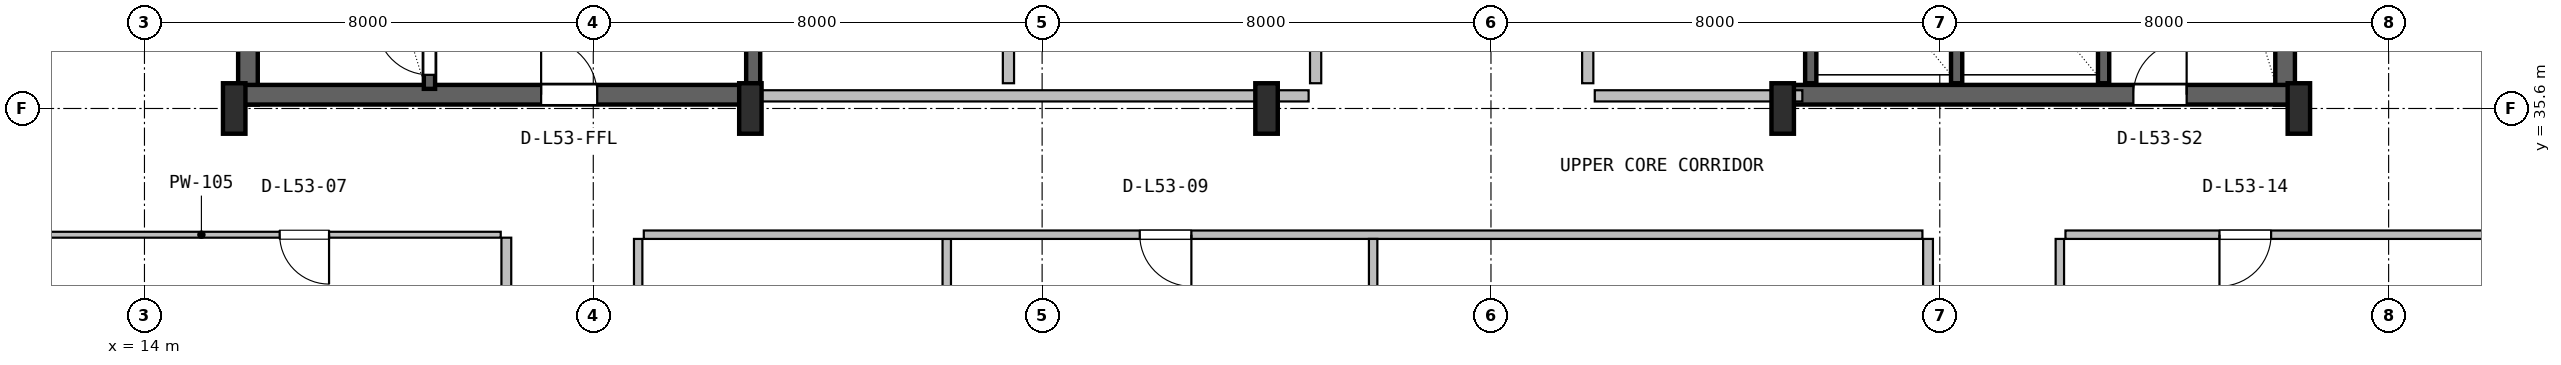
"""IFC4 building model, lengths in metres.
Left out: names, types, materials, properties, quantities, classifications, styles, units other than length and angle.
Written with IfcOpenShell. Run it as: python <this file> out.ifc"""

import sys

from ifc_helpers import new_model, si_unit, direction, frame, frame_2d, origin, origin_2d, place, context, subcontext, project, spatial, rectangle, i_section, extrude, source, transform, mapped, element, fill, save


model = new_model("IFC4")
c1 = context("Model", 3, precision=1e-05, world=origin(), true_north=direction((0.0, 1.0)))
c2 = subcontext(c1, "Body", "Model", "MODEL_VIEW")
j1 = project(units=[si_unit("LENGTHUNIT", "METRE"), si_unit("PLANEANGLEUNIT", "RADIAN")], contexts=[c1])
p1 = place(None, origin())
s1 = spatial("IfcSite", under=j1, at=p1, CompositionType="ELEMENT")
p2 = place(p1, origin())
s2 = spatial("IfcBuilding", under=s1, at=p2, CompositionType="ELEMENT")
p3 = place(p2, frame((0.0, 0.0, 215.0)))
s3 = spatial("IfcBuildingStorey", under=s2, at=p3, CompositionType="ELEMENT", Elevation=215.0)
for number, where, z_axis, x_axis in (
    (1, (15.845, 35.67, 0.0), (0.0, 0.0, 1.0), (0.0, 1.0, 0.0)),
    (2, (52.155, 35.67, 0.0), (0.0, 0.0, 1.0), (0.0, 1.0, 0.0)),
):
    element("IfcWall", number, at=place(p3, frame(where, z_axis=z_axis, x_axis=x_axis)), inside=s3, PredefinedType="SHEAR", context=c2, shape_type="SweptSolid", body=[
        extrude(rectangle(XDim=11.13, YDim=0.35, at=frame_2d((5.565, 0.0))), origin(), (0.0, 0.0, 1.0), 3.55),
    ])
p4 = place(p3, frame((15.67, 35.845, 0.0), z_axis=(0.0, 0.0, 1.0), x_axis=(1.0, 0.0, 0.0)))
e3 = element("IfcWall", 3, at=p4, inside=s3, PredefinedType="SHEAR", context=c2, shape_type="SweptSolid", body=[
    extrude(rectangle(XDim=9.13, YDim=0.35, at=frame_2d((4.565, 0.0))), origin(), (0.0, 0.0, 1.0), 3.55),
])
p5 = place(p4, frame((5.4, 0.0, 0.0)))
e4 = element("IfcOpeningElement", 4, at=p5, cuts=e3, PredefinedType="OPENING", context=c2, shape_type="SweptSolid", body=[
    extrude(rectangle(XDim=1.0, YDim=2.1, at=frame_2d((0.5, 1.05))), frame((0.0, 0.185, 0.0), z_axis=(0.0, -1.0, 0.0), x_axis=(1.0, 0.0, 0.0)), (0.0, 0.0, 1.0), 0.37),
])
p6 = place(p3, frame((43.2, 35.845, 0.0), z_axis=(0.0, 0.0, 1.0), x_axis=(1.0, 0.0, 0.0)))
e5 = element("IfcWall", 5, at=p6, inside=s3, PredefinedType="SHEAR", context=c2, shape_type="SweptSolid", body=[
    extrude(rectangle(XDim=9.13, YDim=0.35, at=frame_2d((4.565, 0.0))), origin(), (0.0, 0.0, 1.0), 3.55),
])
p7 = place(p6, frame((6.25, 0.0, 0.0)))
e6 = element("IfcOpeningElement", 6, at=p7, cuts=e5, PredefinedType="OPENING", context=c2, shape_type="SweptSolid", body=[
    extrude(rectangle(XDim=0.95, YDim=2.1, at=frame_2d((0.475, 1.05))), frame((0.0, 0.185, 0.0), z_axis=(0.0, -1.0, 0.0), x_axis=(1.0, 0.0, 0.0)), (0.0, 0.0, 1.0), 0.37),
])
m1 = source(origin(), c2, "Body", "SweptSolid", [
    extrude(i_section(OverallWidth=0.4, OverallDepth=0.9, WebThickness=0.016, FlangeThickness=0.028, FilletRadius=0.016, at=origin_2d()), origin(), (0.0, 0.0, 1.0), 3.8),
])
for number, where, z_axis, x_axis in (
    (7, (15.6, 35.6, 0.0), (0.0, 0.0, 1.0), (1.0, 0.0, 0.0)),
    (8, (24.8, 35.6, 0.0), (0.0, 0.0, 1.0), (1.0, 0.0, 0.0)),
    (9, (34.0, 35.6, 0.0), (0.0, 0.0, 1.0), (1.0, 0.0, 0.0)),
    (10, (43.2, 35.6, 0.0), (0.0, 0.0, 1.0), (1.0, 0.0, 0.0)),
    (11, (52.4, 35.6, 0.0), (0.0, 0.0, 1.0), (1.0, 0.0, 0.0)),
):
    element("IfcColumn", number, at=place(p3, frame(where, z_axis=z_axis, x_axis=x_axis)), inside=s3, PredefinedType="COLUMN", context=c2, shape_type="MappedRepresentation", body=[
        mapped(m1, transform((0.0, 0.0, 0.0), x_axis=(1.0, 0.0, 0.0), y_axis=(0.0, 1.0, 0.0), z_axis=(0.0, 0.0, 1.0), scale=1.0)),
    ])
p8 = place(p3, frame((19.08, 35.95, 0.0), z_axis=(0.0, 0.0, 1.0), x_axis=(0.0, 1.0, 0.0)))
e12 = element("IfcWall", 12, at=p8, inside=s3, PredefinedType="SHEAR", context=c2, shape_type="SweptSolid", body=[
    extrude(rectangle(XDim=9.65, YDim=0.2, at=frame_2d((4.825, 0.0))), origin(), (0.0, 0.0, 1.0), 3.55),
])
p9 = place(p8, frame((0.25, 0.0, 0.0)))
e13 = element("IfcOpeningElement", 13, at=p9, cuts=e12, PredefinedType="OPENING", context=c2, shape_type="SweptSolid", body=[
    extrude(rectangle(XDim=0.95, YDim=2.1, at=frame_2d((0.475, 1.05))), frame((0.0, 0.11, 0.0), z_axis=(0.0, -1.0, 0.0), x_axis=(1.0, 0.0, 0.0)), (0.0, 0.0, 1.0), 0.22),
])
p10 = place(p3, frame((24.85, 36.05, 0.0), z_axis=(0.0, 0.0, 1.0), x_axis=(0.0, 1.0, 0.0)))
e14 = element("IfcWall", 14, at=p10, inside=s3, PredefinedType="SHEAR", context=c2, shape_type="SweptSolid", body=[
    extrude(rectangle(XDim=10.45, YDim=0.25, at=frame_2d((5.225, 0.0))), origin(), (0.0, 0.0, 1.0), 3.55),
])
p11 = place(p3, frame((48.92, 36.05, 0.0), z_axis=(0.0, 0.0, 1.0), x_axis=(0.0, 1.0, 0.0)))
e15 = element("IfcWall", 15, at=p11, inside=s3, PredefinedType="SHEAR", context=c2, shape_type="SweptSolid", body=[
    extrude(rectangle(XDim=10.5, YDim=0.2, at=frame_2d((5.25, 0.0))), origin(), (0.0, 0.0, 1.0), 3.55),
])
for number, where, z_axis, x_axis in (
    (16, (43.7, 36.05, 0.0), (0.0, 0.0, 1.0), (0.0, 1.0, 0.0)),
    (17, (46.3, 36.05, 0.0), (0.0, 0.0, 1.0), (0.0, 1.0, 0.0)),
):
    element("IfcWall", number, at=place(p3, frame(where, z_axis=z_axis, x_axis=x_axis)), inside=s3, PredefinedType="SHEAR", context=c2, shape_type="SweptSolid", body=[
        extrude(rectangle(XDim=3.05, YDim=0.2, at=frame_2d((1.525, 0.0))), origin(), (0.0, 0.0, 1.0), 3.55),
    ])
p12 = place(p3, frame((25.0, 35.825, 0.0), z_axis=(0.0, 0.0, 1.0), x_axis=(1.0, 0.0, 0.0)))
e18 = element("IfcWall", 18, at=p12, inside=s3, PredefinedType="PLUMBINGWALL", context=c2, shape_type="SweptSolid", body=[
    extrude(rectangle(XDim=9.75, YDim=0.2, at=frame_2d((4.875, 0.0))), origin(), (0.0, 0.0, 1.0), 2.575),
])
for number, where, z_axis, x_axis in (
    (19, (29.4, 36.05, 0.0), (0.0, 0.0, 1.0), (0.0, 1.0, 0.0)),
    (20, (34.875, 36.05, 0.0), (0.0, 0.0, 1.0), (0.0, 1.0, 0.0)),
):
    element("IfcWall", number, at=place(p3, frame(where, z_axis=z_axis, x_axis=x_axis)), inside=s3, PredefinedType="PLUMBINGWALL", context=c2, shape_type="SweptSolid", body=[
        extrude(rectangle(XDim=3.1, YDim=0.2, at=frame_2d((1.55, 0.0))), origin(), (0.0, 0.0, 1.0), 3.53),
    ])
p13 = place(p3, frame((39.85, 35.825, 0.0), z_axis=(0.0, 0.0, 1.0), x_axis=(1.0, 0.0, 0.0)))
e21 = element("IfcWall", 21, at=p13, inside=s3, PredefinedType="SOLIDWALL", context=c2, shape_type="SweptSolid", body=[
    extrude(rectangle(XDim=3.7, YDim=0.2, at=frame_2d((1.85, 0.0))), origin(), (0.0, 0.0, 1.0), 2.575),
])
p14 = place(p3, frame((39.725, 36.05, 0.0), z_axis=(0.0, 0.0, 1.0), x_axis=(0.0, 1.0, 0.0)))
e22 = element("IfcWall", 22, at=p14, inside=s3, PredefinedType="SOLIDWALL", context=c2, shape_type="SweptSolid", body=[
    extrude(rectangle(XDim=3.1, YDim=0.2, at=frame_2d((1.55, 0.0))), origin(), (0.0, 0.0, 1.0), 3.53),
])
p15 = place(p3, frame((20.45, 10.38, 0.0), z_axis=(0.0, 0.0, 1.0), x_axis=(0.0, 1.0, 0.0)))
e23 = element("IfcWall", 23, at=p15, inside=s3, PredefinedType="PARTITIONING", context=c2, shape_type="SweptSolid", body=[
    extrude(rectangle(XDim=22.917, YDim=0.175, at=frame_2d((11.458, 0.0))), origin(), (0.0, 0.0, 1.0), 3.171),
])
p16 = place(p15, frame((2.935, 0.0, 0.0)))
e24 = element("IfcOpeningElement", 24, at=p16, cuts=e23, PredefinedType="OPENING", context=c2, shape_type="SweptSolid", body=[
    extrude(rectangle(XDim=1.05, YDim=2.1, at=frame_2d((0.525, 1.05))), frame((0.0, 0.098, 0.0), z_axis=(0.0, -1.0, 0.0), x_axis=(1.0, 0.0, 0.0)), (0.0, 0.0, 1.0), 0.195),
])
p17 = place(p15, frame((9.29, 0.0, 0.0)))
e25 = element("IfcOpeningElement", 25, at=p17, cuts=e23, PredefinedType="OPENING", context=c2, shape_type="SweptSolid", body=[
    extrude(rectangle(XDim=0.88, YDim=2.06, at=frame_2d((0.44, 1.03))), frame((0.0, 0.098, 0.0), z_axis=(0.0, -1.0, 0.0), x_axis=(1.0, 0.0, 0.0)), (0.0, 0.0, 1.0), 0.195),
])
p18 = place(p15, frame((14.815, 0.0, 0.0)))
e26 = element("IfcOpeningElement", 26, at=p18, cuts=e23, PredefinedType="OPENING", context=c2, shape_type="SweptSolid", body=[
    extrude(rectangle(XDim=1.0, YDim=2.1, at=frame_2d((0.5, 1.05))), frame((0.0, 0.098, 0.0), z_axis=(0.0, -1.0, 0.0), x_axis=(1.0, 0.0, 0.0)), (0.0, 0.0, 1.0), 0.195),
])
p19 = place(p3, frame((9.68, 33.35, 0.0), z_axis=(0.0, 0.0, 1.0), x_axis=(1.0, 0.0, 0.0)))
e27 = element("IfcWall", 27, at=p19, inside=s3, PredefinedType="PARTITIONING", context=c2, shape_type="SweptSolid", body=[
    extrude(rectangle(XDim=10.67, YDim=0.105, at=frame_2d((5.335, 0.0))), origin(), (0.0, 0.0, 1.0), 3.171),
])
p20 = place(p19, frame((6.73, 0.0, 0.0)))
e28 = element("IfcOpeningElement", 28, at=p20, cuts=e27, PredefinedType="OPENING", context=c2, shape_type="SweptSolid", body=[
    extrude(rectangle(XDim=0.88, YDim=2.06, at=frame_2d((0.44, 1.03))), frame((0.0, 0.062, 0.0), z_axis=(0.0, -1.0, 0.0), x_axis=(1.0, 0.0, 0.0)), (0.0, 0.0, 1.0), 0.125),
])
p21 = place(p3, frame((28.3, 10.38, 0.0), z_axis=(0.0, 0.0, 1.0), x_axis=(0.0, 1.0, 0.0)))
e29 = element("IfcWall", 29, at=p21, inside=s3, PredefinedType="PARTITIONING", context=c2, shape_type="SweptSolid", body=[
    extrude(rectangle(XDim=22.895, YDim=0.15, at=frame_2d((11.448, 0.0))), origin(), (0.0, 0.0, 1.0), 2.908),
])
p22 = place(p3, frame((22.9, 33.35, 0.0), z_axis=(0.0, 0.0, 1.0), x_axis=(1.0, 0.0, 0.0)))
e30 = element("IfcWall", 30, at=p22, inside=s3, PredefinedType="PARTITIONING", context=c2, shape_type="SweptSolid", body=[
    extrude(rectangle(XDim=22.79, YDim=0.15, at=frame_2d((11.395, 0.0))), origin(), (0.0, 0.0, 1.0), 2.908),
])
p23 = place(p22, frame((8.84, 0.0, 0.0)))
e31 = element("IfcOpeningElement", 31, at=p23, cuts=e30, PredefinedType="OPENING", context=c2, shape_type="SweptSolid", body=[
    extrude(rectangle(XDim=0.92, YDim=2.08, at=frame_2d((0.46, 1.04))), frame((0.0, 0.085, 0.0), z_axis=(0.0, -1.0, 0.0), x_axis=(1.0, 0.0, 0.0)), (0.0, 0.0, 1.0), 0.17),
])
p24 = place(p3, frame((22.8, 10.38, 0.0), z_axis=(0.0, 0.0, 1.0), x_axis=(0.0, 1.0, 0.0)))
e32 = element("IfcWall", 32, at=p24, inside=s3, PredefinedType="PARTITIONING", context=c2, shape_type="SweptSolid", body=[
    extrude(rectangle(XDim=22.895, YDim=0.15, at=frame_2d((11.448, 0.0))), origin(), (0.0, 0.0, 1.0), 3.171),
])
p25 = place(p24, frame((11.43, 0.0, 0.0)))
e33 = element("IfcOpeningElement", 33, at=p25, cuts=e32, PredefinedType="OPENING", context=c2, shape_type="SweptSolid", body=[
    extrude(rectangle(XDim=0.92, YDim=2.08, at=frame_2d((0.46, 1.04))), frame((0.0, 0.085, 0.0), z_axis=(0.0, -1.0, 0.0), x_axis=(1.0, 0.0, 0.0)), (0.0, 0.0, 1.0), 0.17),
])
p26 = place(p3, frame((35.9, 10.38, 0.0), z_axis=(0.0, 0.0, 1.0), x_axis=(0.0, 1.0, 0.0)))
e34 = element("IfcWall", 34, at=p26, inside=s3, PredefinedType="PARTITIONING", context=c2, shape_type="SweptSolid", body=[
    extrude(rectangle(XDim=22.895, YDim=0.15, at=frame_2d((11.448, 0.0))), origin(), (0.0, 0.0, 1.0), 2.908),
])
p27 = place(p3, frame((45.79, 10.38, 0.0), z_axis=(0.0, 0.0, 1.0), x_axis=(0.0, 1.0, 0.0)))
e35 = element("IfcWall", 35, at=p27, inside=s3, PredefinedType="PARTITIONING", context=c2, shape_type="SweptSolid", body=[
    extrude(rectangle(XDim=22.895, YDim=0.175, at=frame_2d((11.448, 0.0))), origin(), (0.0, 0.0, 1.0), 2.908),
])
p28 = place(p27, frame((11.365, 0.0, 0.0)))
e36 = element("IfcOpeningElement", 36, at=p28, cuts=e35, PredefinedType="OPENING", context=c2, shape_type="SweptSolid", body=[
    extrude(rectangle(XDim=1.05, YDim=2.1, at=frame_2d((0.525, 1.05))), frame((0.0, 0.098, 0.0), z_axis=(0.0, -1.0, 0.0), x_axis=(1.0, 0.0, 0.0)), (0.0, 0.0, 1.0), 0.195),
])
p29 = place(p3, frame((48.14, 10.38, 0.0), z_axis=(0.0, 0.0, 1.0), x_axis=(0.0, 1.0, 0.0)))
e37 = element("IfcWall", 37, at=p29, inside=s3, PredefinedType="PARTITIONING", context=c2, shape_type="SweptSolid", body=[
    extrude(rectangle(XDim=22.895, YDim=0.15, at=frame_2d((11.448, 0.0))), origin(), (0.0, 0.0, 1.0), 3.171),
])
p30 = place(p29, frame((2.35, 0.0, 0.0)))
e38 = element("IfcOpeningElement", 38, at=p30, cuts=e37, PredefinedType="OPENING", context=c2, shape_type="SweptSolid", body=[
    extrude(rectangle(XDim=0.88, YDim=2.06, at=frame_2d((0.44, 1.03))), frame((0.0, 0.085, 0.0), z_axis=(0.0, -1.0, 0.0), x_axis=(1.0, 0.0, 0.0)), (0.0, 0.0, 1.0), 0.17),
])
p31 = place(p29, frame((7.285, 0.0, 0.0)))
e39 = element("IfcOpeningElement", 39, at=p31, cuts=e37, PredefinedType="OPENING", context=c2, shape_type="SweptSolid", body=[
    extrude(rectangle(XDim=1.0, YDim=2.1, at=frame_2d((0.5, 1.05))), frame((0.0, 0.085, 0.0), z_axis=(0.0, -1.0, 0.0), x_axis=(1.0, 0.0, 0.0)), (0.0, 0.0, 1.0), 0.17),
])
p32 = place(p29, frame((14.27, 0.0, 0.0)))
e40 = element("IfcOpeningElement", 40, at=p32, cuts=e37, PredefinedType="OPENING", context=c2, shape_type="SweptSolid", body=[
    extrude(rectangle(XDim=0.88, YDim=2.06, at=frame_2d((0.44, 1.03))), frame((0.0, 0.085, 0.0), z_axis=(0.0, -1.0, 0.0), x_axis=(1.0, 0.0, 0.0)), (0.0, 0.0, 1.0), 0.17),
])
p33 = place(p3, frame((48.24, 33.35, 0.0), z_axis=(0.0, 0.0, 1.0), x_axis=(1.0, 0.0, 0.0)))
e41 = element("IfcWall", 41, at=p33, inside=s3, PredefinedType="PARTITIONING", context=c2, shape_type="SweptSolid", body=[
    extrude(rectangle(XDim=10.08, YDim=0.15, at=frame_2d((5.04, 0.0))), origin(), (0.0, 0.0, 1.0), 3.171),
])
p34 = place(p33, frame((2.745, 0.0, 0.0)))
e42 = element("IfcOpeningElement", 42, at=p34, cuts=e41, PredefinedType="OPENING", context=c2, shape_type="SweptSolid", body=[
    extrude(rectangle(XDim=0.92, YDim=2.08, at=frame_2d((0.46, 1.04))), frame((0.0, 0.085, 0.0), z_axis=(0.0, -1.0, 0.0), x_axis=(1.0, 0.0, 0.0)), (0.0, 0.0, 1.0), 0.17),
])
m2 = source(origin(), c2, "Body", "SweptSolid", [
    extrude(rectangle(XDim=0.95, YDim=2.1, at=frame_2d((0.475, 1.05))), frame((0.0, 0.025, 0.0), z_axis=(0.0, -1.0, 0.0), x_axis=(1.0, 0.0, 0.0)), (0.0, 0.0, 1.0), 0.05),
])
p35 = place(p9, origin())
e43 = element("IfcDoor", 43, at=p35, inside=s3, OperationType="SINGLE_SWING_RIGHT", PredefinedType="DOOR", context=c2, shape_type="MappedRepresentation", body=[
    mapped(m2, transform((0.0, 0.0, 0.0), x_axis=(1.0, 0.0, 0.0), y_axis=(0.0, 1.0, 0.0), z_axis=(0.0, 0.0, 1.0), scale=1.0)),
])
fill(e13, e43)
m3 = source(origin(), c2, "Body", "SweptSolid", [
    extrude(rectangle(XDim=1.0, YDim=2.1, at=frame_2d((0.5, 1.05))), frame((0.0, 0.025, 0.0), z_axis=(0.0, -1.0, 0.0), x_axis=(1.0, 0.0, 0.0)), (0.0, 0.0, 1.0), 0.05),
])
p36 = place(p5, origin())
e44 = element("IfcDoor", 44, at=p36, inside=s3, OperationType="SINGLE_SWING_LEFT", PredefinedType="DOOR", context=c2, shape_type="MappedRepresentation", body=[
    mapped(m3, transform((0.0, 0.0, 0.0), x_axis=(1.0, 0.0, 0.0), y_axis=(0.0, 1.0, 0.0), z_axis=(0.0, 0.0, 1.0), scale=1.0)),
])
fill(e4, e44)
p37 = place(p7, origin())
e45 = element("IfcDoor", 45, at=p37, inside=s3, OperationType="SINGLE_SWING_RIGHT", PredefinedType="DOOR", context=c2, shape_type="MappedRepresentation", body=[
    mapped(m2, transform((0.0, 0.0, 0.0), x_axis=(1.0, 0.0, 0.0), y_axis=(0.0, 1.0, 0.0), z_axis=(0.0, 0.0, 1.0), scale=1.0)),
])
fill(e6, e45)
m4 = source(origin(), c2, "Body", "SweptSolid", [
    extrude(rectangle(XDim=0.88, YDim=2.06, at=frame_2d((0.44, 1.03))), frame((0.0, 0.025, 0.0), z_axis=(0.0, -1.0, 0.0), x_axis=(1.0, 0.0, 0.0)), (0.0, 0.0, 1.0), 0.05),
])
p38 = place(p20, frame((0.88, 0.0, 0.0), z_axis=(0.0, 0.0, 1.0), x_axis=(-1.0, 0.0, 0.0)))
e46 = element("IfcDoor", 46, at=p38, inside=s3, OperationType="SINGLE_SWING_RIGHT", PredefinedType="DOOR", context=c2, shape_type="MappedRepresentation", body=[
    mapped(m4, transform((0.0, 0.0, 0.0), x_axis=(1.0, 0.0, 0.0), y_axis=(0.0, 1.0, 0.0), z_axis=(0.0, 0.0, 1.0), scale=1.0)),
])
fill(e28, e46)
m5 = source(origin(), c2, "Body", "SweptSolid", [
    extrude(rectangle(XDim=0.92, YDim=2.08, at=frame_2d((0.46, 1.04))), frame((0.0, 0.025, 0.0), z_axis=(0.0, -1.0, 0.0), x_axis=(1.0, 0.0, 0.0)), (0.0, 0.0, 1.0), 0.05),
])
p39 = place(p23, frame((0.92, 0.0, 0.0), z_axis=(0.0, 0.0, 1.0), x_axis=(-1.0, 0.0, 0.0)))
e47 = element("IfcDoor", 47, at=p39, inside=s3, OperationType="SINGLE_SWING_RIGHT", PredefinedType="DOOR", context=c2, shape_type="MappedRepresentation", body=[
    mapped(m5, transform((0.0, 0.0, 0.0), x_axis=(1.0, 0.0, 0.0), y_axis=(0.0, 1.0, 0.0), z_axis=(0.0, 0.0, 1.0), scale=1.0)),
])
fill(e31, e47)
p40 = place(p34, frame((0.92, 0.0, 0.0), z_axis=(0.0, 0.0, 1.0), x_axis=(-1.0, 0.0, 0.0)))
e48 = element("IfcDoor", 48, at=p40, inside=s3, OperationType="SINGLE_SWING_LEFT", PredefinedType="DOOR", context=c2, shape_type="MappedRepresentation", body=[
    mapped(m5, transform((0.0, 0.0, 0.0), x_axis=(1.0, 0.0, 0.0), y_axis=(0.0, 1.0, 0.0), z_axis=(0.0, 0.0, 1.0), scale=1.0)),
])
fill(e42, e48)
save(model, sys.argv[1])
